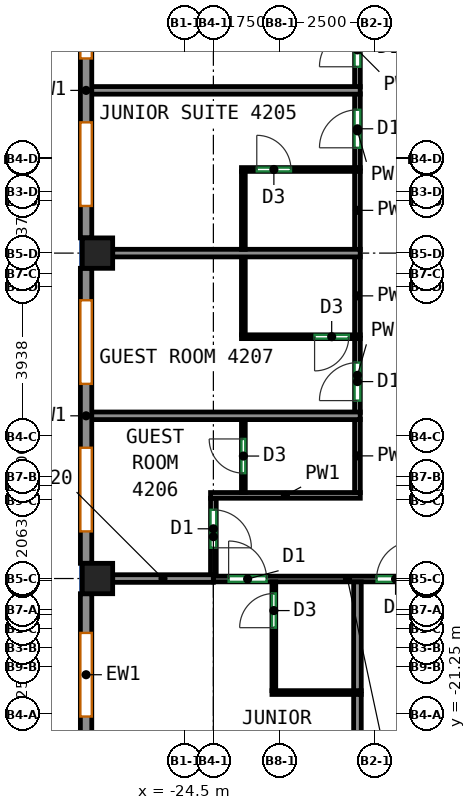
"""IFC4 building model, lengths in metres.
Left out: names, types, materials, properties, quantities, classifications, styles, units other than length and angle.
Written with IfcOpenShell. Run it as: python <this file> out.ifc"""

import sys

from ifc_helpers import new_model, si_unit, direction, frame, frame_2d, origin, origin_2d, place, context, subcontext, project, spatial, rectangle, extrude, source, transform, mapped, element, fill, save


model = new_model("IFC4")
c1 = context("Model", 3, precision=1e-05, world=origin(), true_north=direction((0.0, 1.0)))
c2 = subcontext(c1, "Body", "Model", "MODEL_VIEW")
j1 = project(units=[si_unit("LENGTHUNIT", "METRE"), si_unit("PLANEANGLEUNIT", "RADIAN")], contexts=[c1])
p1 = place(None, origin())
s1 = spatial("IfcSite", under=j1, at=p1, CompositionType="ELEMENT")
p2 = place(p1, origin())
s2 = spatial("IfcBuilding", under=s1, at=p2, CompositionType="ELEMENT")
p3 = place(p2, frame((0.0, 0.0, 178.7)))
s3 = spatial("IfcBuildingStorey", under=s2, at=p3, CompositionType="ELEMENT", Elevation=178.7)
m1 = source(origin(), c2, "Body", "SweptSolid", [
    extrude(rectangle(XDim=0.8, YDim=0.8, at=origin_2d()), origin(), (0.0, 0.0, 1.0), 3.12),
])
for number, where, z_axis, x_axis in (
    (1, (-26.8, -17.688, 0.0), (0.0, 0.0, 1.0), (1.0, 0.0, 0.0)),
    (2, (-26.8, -9.125, 0.0), (0.0, 0.0, 1.0), (1.0, 0.0, 0.0)),
):
    element("IfcColumn", number, at=place(p3, frame(where, z_axis=z_axis, x_axis=x_axis)), inside=s3, PredefinedType="COLUMN", context=c2, shape_type="MappedRepresentation", body=[
        mapped(m1, transform((0.0, 0.0, 0.0))),
    ])
m2 = source(origin(), c2, "Body", "SweptSolid", [
    extrude(rectangle(XDim=7.763, YDim=0.3, at=frame_2d((3.881, 0.0))), origin(), (0.0, 0.0, 1.0), 3.12),
])
p4 = place(p3, frame((-27.1, -0.962, 0.0), z_axis=(0.0, 0.0, 1.0), x_axis=(0.0, -1.0, 0.0)))
e3 = element("IfcWall", 3, at=p4, inside=s3, PredefinedType="SOLIDWALL", context=c2, shape_type="MappedRepresentation", body=[
    mapped(m2, transform((0.0, 0.0, 0.0))),
])
p5 = place(p4, frame((0.841, 0.0, 0.85)))
e4 = element("IfcOpeningElement", 4, at=p5, cuts=e3, PredefinedType="OPENING", context=c2, shape_type="SweptSolid", body=[
    extrude(rectangle(XDim=2.2, YDim=1.95, at=frame_2d((1.1, 0.975))), frame((0.0, 0.16, 0.0), z_axis=(0.0, -1.0, 0.0), x_axis=(1.0, 0.0, 0.0)), (0.0, 0.0, 1.0), 0.32),
])
p6 = place(p4, frame((4.722, 0.0, 0.85)))
e5 = element("IfcOpeningElement", 5, at=p6, cuts=e3, PredefinedType="OPENING", context=c2, shape_type="SweptSolid", body=[
    extrude(rectangle(XDim=2.2, YDim=1.95, at=frame_2d((1.1, 0.975))), frame((0.0, 0.16, 0.0), z_axis=(0.0, -1.0, 0.0), x_axis=(1.0, 0.0, 0.0)), (0.0, 0.0, 1.0), 0.32),
])
p7 = place(p3, frame((-27.1, -9.525, 0.0), z_axis=(0.0, 0.0, 1.0), x_axis=(0.0, -1.0, 0.0)))
e6 = element("IfcWall", 6, at=p7, inside=s3, PredefinedType="SOLIDWALL", context=c2, shape_type="MappedRepresentation", body=[
    mapped(m2, transform((0.0, 0.0, 0.0))),
])
p8 = place(p7, frame((0.841, 0.0, 0.85)))
e7 = element("IfcOpeningElement", 7, at=p8, cuts=e6, PredefinedType="OPENING", context=c2, shape_type="SweptSolid", body=[
    extrude(rectangle(XDim=2.2, YDim=1.95, at=frame_2d((1.1, 0.975))), frame((0.0, 0.16, 0.0), z_axis=(0.0, -1.0, 0.0), x_axis=(1.0, 0.0, 0.0)), (0.0, 0.0, 1.0), 0.32),
])
p9 = place(p7, frame((4.722, 0.0, 0.85)))
e8 = element("IfcOpeningElement", 8, at=p9, cuts=e6, PredefinedType="OPENING", context=c2, shape_type="SweptSolid", body=[
    extrude(rectangle(XDim=2.2, YDim=1.95, at=frame_2d((1.1, 0.975))), frame((0.0, 0.16, 0.0), z_axis=(0.0, -1.0, 0.0), x_axis=(1.0, 0.0, 0.0)), (0.0, 0.0, 1.0), 0.32),
])
m3 = source(origin(), c2, "Body", "SweptSolid", [
    extrude(rectangle(XDim=4.263, YDim=0.3, at=frame_2d((2.131, 0.0))), origin(), (0.0, 0.0, 1.0), 3.12),
])
p10 = place(p3, frame((-27.1, -18.087, 0.0), z_axis=(0.0, 0.0, 1.0), x_axis=(0.0, -1.0, 0.0)))
e9 = element("IfcWall", 9, at=p10, inside=s3, PredefinedType="SOLIDWALL", context=c2, shape_type="MappedRepresentation", body=[
    mapped(m3, transform((0.0, 0.0, 0.0))),
])
p11 = place(p10, frame((1.031, 0.0, 0.85)))
e10 = element("IfcOpeningElement", 10, at=p11, cuts=e9, PredefinedType="OPENING", context=c2, shape_type="SweptSolid", body=[
    extrude(rectangle(XDim=2.2, YDim=1.95, at=frame_2d((1.1, 0.975))), frame((0.0, 0.16, 0.0), z_axis=(0.0, -1.0, 0.0), x_axis=(1.0, 0.0, 0.0)), (0.0, 0.0, 1.0), 0.32),
])
p12 = place(p3, frame((-23.75, -17.7, 0.0), z_axis=(0.0, 0.0, 1.0), x_axis=(1.0, 0.0, 0.0)))
e11 = element("IfcWall", 11, at=p12, inside=s3, PredefinedType="PARTITIONING", context=c2, shape_type="SweptSolid", body=[
    extrude(rectangle(XDim=7.058, YDim=0.15, at=frame_2d((3.529, 0.0))), origin(), (0.0, 0.0, 1.0), 2.52),
])
p13 = place(p12, frame((0.401, 0.0, 0.0)))
e12 = element("IfcOpeningElement", 12, at=p13, cuts=e11, PredefinedType="OPENING", context=c2, shape_type="SweptSolid", body=[
    extrude(rectangle(XDim=1.0, YDim=2.1, at=frame_2d((0.5, 1.05))), frame((0.0, 0.085, 0.0), z_axis=(0.0, -1.0, 0.0), x_axis=(1.0, 0.0, 0.0)), (0.0, 0.0, 1.0), 0.17),
])
p14 = place(p12, frame((4.294, 0.0, 0.0)))
e13 = element("IfcOpeningElement", 13, at=p14, cuts=e11, PredefinedType="OPENING", context=c2, shape_type="SweptSolid", body=[
    extrude(rectangle(XDim=1.0, YDim=2.1, at=frame_2d((0.5, 1.05))), frame((0.0, 0.085, 0.0), z_axis=(0.0, -1.0, 0.0), x_axis=(1.0, 0.0, 0.0)), (0.0, 0.0, 1.0), 0.17),
])
p15 = place(p3, frame((-23.75, -15.575, 0.0), z_axis=(0.0, 0.0, 1.0), x_axis=(0.0, -1.0, 0.0)))
e14 = element("IfcWall", 14, at=p15, inside=s3, PredefinedType="PARTITIONING", context=c2, shape_type="SweptSolid", body=[
    extrude(rectangle(XDim=2.023, YDim=0.15, at=frame_2d((1.011, 0.0))), origin(), (0.0, 0.0, 1.0), 2.52),
])
p16 = place(p15, frame((0.304, 0.0, 0.0)))
e15 = element("IfcOpeningElement", 15, at=p16, cuts=e14, PredefinedType="OPENING", context=c2, shape_type="SweptSolid", body=[
    extrude(rectangle(XDim=1.0, YDim=2.1, at=frame_2d((0.5, 1.05))), frame((0.0, 0.085, 0.0), z_axis=(0.0, -1.0, 0.0), x_axis=(1.0, 0.0, 0.0)), (0.0, 0.0, 1.0), 0.17),
])
p17 = place(p3, frame((-23.825, -15.5, 0.0), z_axis=(0.0, 0.0, 1.0), x_axis=(1.0, 0.0, 0.0)))
e16 = element("IfcWall", 16, at=p17, inside=s3, PredefinedType="PARTITIONING", context=c2, shape_type="SweptSolid", body=[
    extrude(rectangle(XDim=3.941, YDim=0.15, at=frame_2d((1.97, 0.0))), origin(), (0.0, 0.0, 1.0), 3.12),
])
p18 = place(p3, frame((-19.959, -15.425, 0.0), z_axis=(0.0, 0.0, 1.0), x_axis=(0.0, 1.0, 0.0)))
e17 = element("IfcWall", 17, at=p18, inside=s3, PredefinedType="PARTITIONING", context=c2, shape_type="SweptSolid", body=[
    extrude(rectangle(XDim=1.929, YDim=0.15, at=frame_2d((0.964, 0.0))), origin(), (0.0, 0.0, 1.0), 3.12),
])
p19 = place(p3, frame((-19.959, -13.316, 0.0), z_axis=(0.0, 0.0, 1.0), x_axis=(0.0, 1.0, 0.0)))
e18 = element("IfcWall", 18, at=p19, inside=s3, PredefinedType="PARTITIONING", context=c2, shape_type="SweptSolid", body=[
    extrude(rectangle(XDim=1.951, YDim=0.15, at=frame_2d((0.976, 0.0))), origin(), (0.0, 0.0, 1.0), 3.12),
])
p20 = place(p19, frame((0.31, 0.0, 0.0)))
e19 = element("IfcOpeningElement", 19, at=p20, cuts=e18, PredefinedType="OPENING", context=c2, shape_type="SweptSolid", body=[
    extrude(rectangle(XDim=1.0, YDim=2.1, at=frame_2d((0.5, 1.05))), frame((0.0, 0.085, 0.0), z_axis=(0.0, -1.0, 0.0), x_axis=(1.0, 0.0, 0.0)), (0.0, 0.0, 1.0), 0.17),
])
p21 = place(p3, frame((-19.959, -11.285, 0.0), z_axis=(0.0, 0.0, 1.0), x_axis=(0.0, 1.0, 0.0)))
e20 = element("IfcWall", 20, at=p21, inside=s3, PredefinedType="PARTITIONING", context=c2, shape_type="SweptSolid", body=[
    extrude(rectangle(XDim=2.07, YDim=0.15, at=frame_2d((1.035, 0.0))), origin(), (0.0, 0.0, 1.0), 3.12),
])
p22 = place(p3, frame((-19.959, -6.885, 0.0), z_axis=(0.0, 0.0, 1.0), x_axis=(0.0, 1.0, 0.0)))
e21 = element("IfcWall", 21, at=p22, inside=s3, PredefinedType="PARTITIONING", context=c2, shape_type="SweptSolid", body=[
    extrude(rectangle(XDim=1.952, YDim=0.15, at=frame_2d((0.976, 0.0))), origin(), (0.0, 0.0, 1.0), 3.12),
])
p23 = place(p22, frame((0.531, 0.0, 0.0)))
e22 = element("IfcOpeningElement", 22, at=p23, cuts=e21, PredefinedType="OPENING", context=c2, shape_type="SweptSolid", body=[
    extrude(rectangle(XDim=1.0, YDim=2.1, at=frame_2d((0.5, 1.05))), frame((0.0, 0.085, 0.0), z_axis=(0.0, -1.0, 0.0), x_axis=(1.0, 0.0, 0.0)), (0.0, 0.0, 1.0), 0.17),
])
p24 = place(p3, frame((-19.959, -9.035, 0.0), z_axis=(0.0, 0.0, 1.0), x_axis=(0.0, 1.0, 0.0)))
e23 = element("IfcWall", 23, at=p24, inside=s3, PredefinedType="PARTITIONING", context=c2, shape_type="SweptSolid", body=[
    extrude(rectangle(XDim=2.07, YDim=0.15, at=frame_2d((1.035, 0.0))), origin(), (0.0, 0.0, 1.0), 3.12),
])
p25 = place(p3, frame((-19.959, -4.753, 0.0), z_axis=(0.0, 0.0, 1.0), x_axis=(0.0, 1.0, 0.0)))
e24 = element("IfcWall", 24, at=p25, inside=s3, PredefinedType="PARTITIONING", context=c2, shape_type="SweptSolid", body=[
    extrude(rectangle(XDim=1.951, YDim=0.15, at=frame_2d((0.976, 0.0))), origin(), (0.0, 0.0, 1.0), 3.12),
])
p26 = place(p25, frame((0.531, 0.0, 0.0)))
e25 = element("IfcOpeningElement", 25, at=p26, cuts=e24, PredefinedType="OPENING", context=c2, shape_type="SweptSolid", body=[
    extrude(rectangle(XDim=1.0, YDim=2.1, at=frame_2d((0.5, 1.05))), frame((0.0, 0.085, 0.0), z_axis=(0.0, -1.0, 0.0), x_axis=(1.0, 0.0, 0.0)), (0.0, 0.0, 1.0), 0.17),
])
p27 = place(p3, frame((-22.159, -20.638, 0.0), z_axis=(0.0, 0.0, 1.0), x_axis=(0.0, 1.0, 0.0)))
e26 = element("IfcWall", 26, at=p27, inside=s3, PredefinedType="PARTITIONING", context=c2, shape_type="SweptSolid", body=[
    extrude(rectangle(XDim=2.861, YDim=0.1, at=frame_2d((1.43, 0.0))), origin(), (0.0, 0.0, 1.0), 3.12),
])
p28 = place(p27, frame((1.657, 0.0, 0.0)))
e27 = element("IfcOpeningElement", 27, at=p28, cuts=e26, PredefinedType="OPENING", context=c2, shape_type="SweptSolid", body=[
    extrude(rectangle(XDim=0.9, YDim=2.1, at=frame_2d((0.45, 1.05))), frame((0.0, 0.06, 0.0), z_axis=(0.0, -1.0, 0.0), x_axis=(1.0, 0.0, 0.0)), (0.0, 0.0, 1.0), 0.12),
])
p29 = place(p3, frame((-22.209, -20.688, 0.0), z_axis=(0.0, 0.0, 1.0), x_axis=(1.0, 0.0, 0.0)))
e28 = element("IfcWall", 28, at=p29, inside=s3, PredefinedType="PARTITIONING", context=c2, shape_type="SweptSolid", body=[
    extrude(rectangle(XDim=2.35, YDim=0.1, at=frame_2d((1.175, 0.0))), origin(), (0.0, 0.0, 1.0), 3.12),
])
p30 = place(p3, frame((-19.959, -26.0, 0.0), z_axis=(0.0, 0.0, 1.0), x_axis=(0.0, 1.0, 0.0)))
e29 = element("IfcWall", 29, at=p30, inside=s3, PredefinedType="PARTITIONING", context=c2, shape_type="SweptSolid", body=[
    extrude(rectangle(XDim=5.262, YDim=0.2, at=frame_2d((2.631, 0.0))), origin(), (0.0, 0.0, 1.0), 3.12),
])
p31 = place(p3, frame((-26.4, -17.688, 0.0), z_axis=(0.0, 0.0, 1.0), x_axis=(1.0, 0.0, 0.0)))
e30 = element("IfcWall", 30, at=p31, inside=s3, PredefinedType="PARTITIONING", context=c2, shape_type="SweptSolid", body=[
    extrude(rectangle(XDim=2.648, YDim=0.2, at=frame_2d((1.324, 0.0))), origin(), (0.0, 0.0, 1.0), 2.52),
])
p32 = place(p3, frame((-19.959, -20.638, 0.0), z_axis=(0.0, 0.0, 1.0), x_axis=(0.0, 1.0, 0.0)))
e31 = element("IfcWall", 31, at=p32, inside=s3, PredefinedType="PARTITIONING", context=c2, shape_type="SweptSolid", body=[
    extrude(rectangle(XDim=2.861, YDim=0.2, at=frame_2d((1.43, 0.0))), origin(), (0.0, 0.0, 1.0), 3.12),
])
p33 = place(p3, frame((-22.961, -15.423, 0.0), z_axis=(0.0, 0.0, 1.0), x_axis=(0.0, 1.0, 0.0)))
e32 = element("IfcWall", 32, at=p33, inside=s3, PredefinedType="PARTITIONING", context=c2, shape_type="SweptSolid", body=[
    extrude(rectangle(XDim=1.917, YDim=0.1, at=frame_2d((0.958, 0.0))), origin(), (0.0, 0.0, 1.0), 3.12),
])
p34 = place(p33, frame((0.508, 0.0, 0.0)))
e33 = element("IfcOpeningElement", 33, at=p34, cuts=e32, PredefinedType="OPENING", context=c2, shape_type="SweptSolid", body=[
    extrude(rectangle(XDim=0.9, YDim=2.1, at=frame_2d((0.45, 1.05))), frame((0.0, 0.06, 0.0), z_axis=(0.0, -1.0, 0.0), x_axis=(1.0, 0.0, 0.0)), (0.0, 0.0, 1.0), 0.12),
])
p35 = place(p3, frame((-27.0, -13.406, 0.0), z_axis=(0.0, 0.0, 1.0), x_axis=(1.0, 0.0, 0.0)))
e34 = element("IfcWall", 34, at=p35, inside=s3, PredefinedType="PARTITIONING", context=c2, shape_type="SweptSolid", body=[
    extrude(rectangle(XDim=7.114, YDim=0.2, at=frame_2d((3.557, 0.0))), origin(), (0.0, 0.0, 1.0), 3.12),
])
p36 = place(p3, frame((-19.886, -11.325, 0.0), z_axis=(0.0, 0.0, 1.0), x_axis=(-1.0, 0.0, 0.0)))
e35 = element("IfcWall", 35, at=p36, inside=s3, PredefinedType="PARTITIONING", context=c2, shape_type="SweptSolid", body=[
    extrude(rectangle(XDim=3.125, YDim=0.1, at=frame_2d((1.562, 0.0))), origin(), (0.0, 0.0, 1.0), 3.12),
])
p37 = place(p36, frame((0.301, 0.0, 0.0)))
e36 = element("IfcOpeningElement", 36, at=p37, cuts=e35, PredefinedType="OPENING", context=c2, shape_type="SweptSolid", body=[
    extrude(rectangle(XDim=0.9, YDim=2.1, at=frame_2d((0.45, 1.05))), frame((0.0, 0.06, 0.0), z_axis=(0.0, -1.0, 0.0), x_axis=(1.0, 0.0, 0.0)), (0.0, 0.0, 1.0), 0.12),
])
p38 = place(p3, frame((-22.961, -11.275, 0.0), z_axis=(0.0, 0.0, 1.0), x_axis=(0.0, 1.0, 0.0)))
e37 = element("IfcWall", 37, at=p38, inside=s3, PredefinedType="PARTITIONING", context=c2, shape_type="SweptSolid", body=[
    extrude(rectangle(XDim=2.05, YDim=0.1, at=frame_2d((1.025, 0.0))), origin(), (0.0, 0.0, 1.0), 3.12),
])
p39 = place(p3, frame((-26.4, -9.125, 0.0), z_axis=(0.0, 0.0, 1.0), x_axis=(1.0, 0.0, 0.0)))
e38 = element("IfcWall", 38, at=p39, inside=s3, PredefinedType="PARTITIONING", context=c2, shape_type="SweptSolid", body=[
    extrude(rectangle(XDim=6.514, YDim=0.2, at=frame_2d((3.257, 0.0))), origin(), (0.0, 0.0, 1.0), 3.12),
])
p40 = place(p3, frame((-23.011, -6.925, 0.0), z_axis=(0.0, 0.0, 1.0), x_axis=(1.0, 0.0, 0.0)))
e39 = element("IfcWall", 39, at=p40, inside=s3, PredefinedType="PARTITIONING", context=c2, shape_type="SweptSolid", body=[
    extrude(rectangle(XDim=3.125, YDim=0.1, at=frame_2d((1.562, 0.0))), origin(), (0.0, 0.0, 1.0), 3.12),
])
p41 = place(p40, frame((0.403, 0.0, 0.0)))
e40 = element("IfcOpeningElement", 40, at=p41, cuts=e39, PredefinedType="OPENING", context=c2, shape_type="SweptSolid", body=[
    extrude(rectangle(XDim=0.9, YDim=2.1, at=frame_2d((0.45, 1.05))), frame((0.0, 0.06, 0.0), z_axis=(0.0, -1.0, 0.0), x_axis=(1.0, 0.0, 0.0)), (0.0, 0.0, 1.0), 0.12),
])
p42 = place(p3, frame((-22.961, -9.025, 0.0), z_axis=(0.0, 0.0, 1.0), x_axis=(0.0, 1.0, 0.0)))
e41 = element("IfcWall", 41, at=p42, inside=s3, PredefinedType="PARTITIONING", context=c2, shape_type="SweptSolid", body=[
    extrude(rectangle(XDim=2.05, YDim=0.1, at=frame_2d((1.025, 0.0))), origin(), (0.0, 0.0, 1.0), 3.12),
])
p43 = place(p3, frame((-27.0, -4.843, 0.0), z_axis=(0.0, 0.0, 1.0), x_axis=(1.0, 0.0, 0.0)))
e42 = element("IfcWall", 42, at=p43, inside=s3, PredefinedType="PARTITIONING", context=c2, shape_type="SweptSolid", body=[
    extrude(rectangle(XDim=7.114, YDim=0.2, at=frame_2d((3.557, 0.0))), origin(), (0.0, 0.0, 1.0), 3.12),
])
p44 = place(p5, origin())
e43 = element("IfcWindow", 43, at=p44, inside=s3, PartitioningType="SINGLE_PANEL", PredefinedType="WINDOW", context=c2, shape_type="SweptSolid", body=[
    extrude(rectangle(XDim=2.2, YDim=1.95, at=frame_2d((1.1, 0.975))), frame((0.0, 0.03, 0.0), z_axis=(0.0, -1.0, 0.0), x_axis=(1.0, 0.0, 0.0)), (0.0, 0.0, 1.0), 0.06),
])
fill(e4, e43)
p45 = place(p6, origin())
e44 = element("IfcWindow", 44, at=p45, inside=s3, PartitioningType="SINGLE_PANEL", PredefinedType="WINDOW", context=c2, shape_type="SweptSolid", body=[
    extrude(rectangle(XDim=2.2, YDim=1.95, at=frame_2d((1.1, 0.975))), frame((0.0, 0.03, 0.0), z_axis=(0.0, -1.0, 0.0), x_axis=(1.0, 0.0, 0.0)), (0.0, 0.0, 1.0), 0.06),
])
fill(e5, e44)
p46 = place(p8, origin())
e45 = element("IfcWindow", 45, at=p46, inside=s3, PartitioningType="SINGLE_PANEL", PredefinedType="WINDOW", context=c2, shape_type="SweptSolid", body=[
    extrude(rectangle(XDim=2.2, YDim=1.95, at=frame_2d((1.1, 0.975))), frame((0.0, 0.03, 0.0), z_axis=(0.0, -1.0, 0.0), x_axis=(1.0, 0.0, 0.0)), (0.0, 0.0, 1.0), 0.06),
])
fill(e7, e45)
p47 = place(p9, origin())
e46 = element("IfcWindow", 46, at=p47, inside=s3, PartitioningType="SINGLE_PANEL", PredefinedType="WINDOW", context=c2, shape_type="SweptSolid", body=[
    extrude(rectangle(XDim=2.2, YDim=1.95, at=frame_2d((1.1, 0.975))), frame((0.0, 0.03, 0.0), z_axis=(0.0, -1.0, 0.0), x_axis=(1.0, 0.0, 0.0)), (0.0, 0.0, 1.0), 0.06),
])
fill(e8, e46)
p48 = place(p11, origin())
e47 = element("IfcWindow", 47, at=p48, inside=s3, PartitioningType="SINGLE_PANEL", PredefinedType="WINDOW", context=c2, shape_type="SweptSolid", body=[
    extrude(rectangle(XDim=2.2, YDim=1.95, at=frame_2d((1.1, 0.975))), frame((0.0, 0.03, 0.0), z_axis=(0.0, -1.0, 0.0), x_axis=(1.0, 0.0, 0.0)), (0.0, 0.0, 1.0), 0.06),
])
fill(e10, e47)
p49 = place(p28, origin())
e48 = element("IfcDoor", 48, at=p49, inside=s3, OperationType="SINGLE_SWING_LEFT", PredefinedType="DOOR", context=c2, shape_type="SweptSolid", body=[
    extrude(rectangle(XDim=0.9, YDim=2.1, at=frame_2d((0.45, 1.05))), frame((0.0, 0.025, 0.0), z_axis=(0.0, -1.0, 0.0), x_axis=(1.0, 0.0, 0.0)), (0.0, 0.0, 1.0), 0.05),
])
fill(e27, e48)
p50 = place(p13, origin())
e49 = element("IfcDoor", 49, at=p50, inside=s3, OperationType="SINGLE_SWING_LEFT", PredefinedType="DOOR", context=c2, shape_type="SweptSolid", body=[
    extrude(rectangle(XDim=1.0, YDim=2.1, at=frame_2d((0.5, 1.05))), frame((0.0, 0.025, 0.0), z_axis=(0.0, -1.0, 0.0), x_axis=(1.0, 0.0, 0.0)), (0.0, 0.0, 1.0), 0.05),
])
fill(e12, e49)
p51 = place(p14, origin())
e50 = element("IfcDoor", 50, at=p51, inside=s3, OperationType="SINGLE_SWING_RIGHT", PredefinedType="DOOR", context=c2, shape_type="SweptSolid", body=[
    extrude(rectangle(XDim=1.0, YDim=2.1, at=frame_2d((0.5, 1.05))), frame((0.0, 0.025, 0.0), z_axis=(0.0, -1.0, 0.0), x_axis=(1.0, 0.0, 0.0)), (0.0, 0.0, 1.0), 0.05),
])
fill(e13, e50)
p52 = place(p16, origin())
e51 = element("IfcDoor", 51, at=p52, inside=s3, OperationType="SINGLE_SWING_RIGHT", PredefinedType="DOOR", context=c2, shape_type="SweptSolid", body=[
    extrude(rectangle(XDim=1.0, YDim=2.1, at=frame_2d((0.5, 1.05))), frame((0.0, 0.025, 0.0), z_axis=(0.0, -1.0, 0.0), x_axis=(1.0, 0.0, 0.0)), (0.0, 0.0, 1.0), 0.05),
])
fill(e15, e51)
p53 = place(p34, origin())
e52 = element("IfcDoor", 52, at=p53, inside=s3, OperationType="SINGLE_SWING_RIGHT", PredefinedType="DOOR", context=c2, shape_type="SweptSolid", body=[
    extrude(rectangle(XDim=0.9, YDim=2.1, at=frame_2d((0.45, 1.05))), frame((0.0, 0.025, 0.0), z_axis=(0.0, -1.0, 0.0), x_axis=(1.0, 0.0, 0.0)), (0.0, 0.0, 1.0), 0.05),
])
fill(e33, e52)
p54 = place(p20, origin())
e53 = element("IfcDoor", 53, at=p54, inside=s3, OperationType="SINGLE_SWING_LEFT", PredefinedType="DOOR", context=c2, shape_type="SweptSolid", body=[
    extrude(rectangle(XDim=1.0, YDim=2.1, at=frame_2d((0.5, 1.05))), frame((0.0, 0.025, 0.0), z_axis=(0.0, -1.0, 0.0), x_axis=(1.0, 0.0, 0.0)), (0.0, 0.0, 1.0), 0.05),
])
fill(e19, e53)
p55 = place(p37, origin())
e54 = element("IfcDoor", 54, at=p55, inside=s3, OperationType="SINGLE_SWING_RIGHT", PredefinedType="DOOR", context=c2, shape_type="SweptSolid", body=[
    extrude(rectangle(XDim=0.9, YDim=2.1, at=frame_2d((0.45, 1.05))), frame((0.0, 0.025, 0.0), z_axis=(0.0, -1.0, 0.0), x_axis=(1.0, 0.0, 0.0)), (0.0, 0.0, 1.0), 0.05),
])
fill(e36, e54)
p56 = place(p41, origin())
e55 = element("IfcDoor", 55, at=p56, inside=s3, OperationType="SINGLE_SWING_LEFT", PredefinedType="DOOR", context=c2, shape_type="SweptSolid", body=[
    extrude(rectangle(XDim=0.9, YDim=2.1, at=frame_2d((0.45, 1.05))), frame((0.0, 0.025, 0.0), z_axis=(0.0, -1.0, 0.0), x_axis=(1.0, 0.0, 0.0)), (0.0, 0.0, 1.0), 0.05),
])
fill(e40, e55)
p57 = place(p23, origin())
e56 = element("IfcDoor", 56, at=p57, inside=s3, OperationType="SINGLE_SWING_LEFT", PredefinedType="DOOR", context=c2, shape_type="SweptSolid", body=[
    extrude(rectangle(XDim=1.0, YDim=2.1, at=frame_2d((0.5, 1.05))), frame((0.0, 0.025, 0.0), z_axis=(0.0, -1.0, 0.0), x_axis=(1.0, 0.0, 0.0)), (0.0, 0.0, 1.0), 0.05),
])
fill(e22, e56)
p58 = place(p26, origin())
e57 = element("IfcDoor", 57, at=p58, inside=s3, OperationType="SINGLE_SWING_LEFT", PredefinedType="DOOR", context=c2, shape_type="SweptSolid", body=[
    extrude(rectangle(XDim=1.0, YDim=2.1, at=frame_2d((0.5, 1.05))), frame((0.0, 0.025, 0.0), z_axis=(0.0, -1.0, 0.0), x_axis=(1.0, 0.0, 0.0)), (0.0, 0.0, 1.0), 0.05),
])
fill(e25, e57)
save(model, sys.argv[1])
